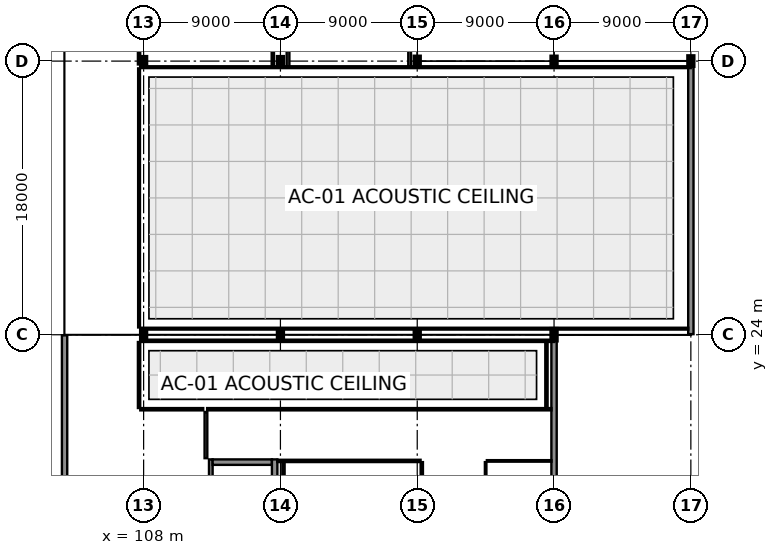
"""IFC4 building model, lengths in metres.
Left out: names, types, materials, properties, quantities, classifications, styles, units other than length and angle.
Written with IfcOpenShell. Run it as: python <this file> out.ifc"""

import sys

from ifc_helpers import new_model, si_unit, direction, frame, frame_2d, origin, origin_2d, place, context, subcontext, project, spatial, rectangle, i_section, extrude, element, fill, save


model = new_model("IFC4")
c1 = context("Model", 3, precision=1e-05, world=origin(), true_north=direction((0.0, 1.0)))
c2 = subcontext(c1, "Body", "Model", "MODEL_VIEW")
j1 = project(units=[si_unit("LENGTHUNIT", "METRE"), si_unit("PLANEANGLEUNIT", "RADIAN")], contexts=[c1])
p1 = place(None, origin())
s1 = spatial("IfcSite", under=j1, at=p1, CompositionType="ELEMENT")
p2 = place(p1, origin())
s2 = spatial("IfcBuilding", under=s1, at=p2, CompositionType="ELEMENT")
p3 = place(p2, origin())
s3 = spatial("IfcBuildingStorey", under=s2, at=p3, CompositionType="ELEMENT", Elevation=0.0)
p4 = place(p3, frame((108.0, 24.0, 0.0), z_axis=(0.0, 0.0, 1.0), x_axis=(1.0, 0.0, 0.0)))
e1 = element("IfcColumn", 1, at=p4, inside=s3, PredefinedType="COLUMN", context=c2, shape_type="SweptSolid", body=[
    extrude(i_section(OverallWidth=0.3, OverallDepth=0.65, WebThickness=0.016, FlangeThickness=0.031, at=origin_2d()), origin(), (0.0, 0.0, 1.0), 5.4),
])
p5 = place(p3, frame((108.0, 42.0, 0.0), z_axis=(0.0, 0.0, 1.0), x_axis=(1.0, 0.0, 0.0)))
e2 = element("IfcColumn", 2, at=p5, inside=s3, PredefinedType="COLUMN", context=c2, shape_type="SweptSolid", body=[
    extrude(i_section(OverallWidth=0.3, OverallDepth=0.5, WebThickness=0.014, FlangeThickness=0.028, at=origin_2d()), origin(), (0.0, 0.0, 1.0), 5.4),
])
p6 = place(p3, frame((117.0, 24.0, 0.0), z_axis=(0.0, 0.0, 1.0), x_axis=(1.0, 0.0, 0.0)))
e3 = element("IfcColumn", 3, at=p6, inside=s3, PredefinedType="COLUMN", context=c2, shape_type="SweptSolid", body=[
    extrude(i_section(OverallWidth=0.3, OverallDepth=0.65, WebThickness=0.016, FlangeThickness=0.031, at=origin_2d()), origin(), (0.0, 0.0, 1.0), 5.4),
])
p7 = place(p3, frame((117.0, 42.0, 0.0), z_axis=(0.0, 0.0, 1.0), x_axis=(0.0, 1.0, 0.0)))
e4 = element("IfcColumn", 4, at=p7, inside=s3, PredefinedType="COLUMN", context=c2, shape_type="SweptSolid", body=[
    extrude(i_section(OverallWidth=0.3, OverallDepth=0.5, WebThickness=0.014, FlangeThickness=0.028, at=origin_2d()), origin(), (0.0, 0.0, 1.0), 5.4),
])
p8 = place(p3, frame((126.0, 24.0, 0.0), z_axis=(0.0, 0.0, 1.0), x_axis=(1.0, 0.0, 0.0)))
e5 = element("IfcColumn", 5, at=p8, inside=s3, PredefinedType="COLUMN", context=c2, shape_type="SweptSolid", body=[
    extrude(i_section(OverallWidth=0.3, OverallDepth=0.65, WebThickness=0.016, FlangeThickness=0.031, at=origin_2d()), origin(), (0.0, 0.0, 1.0), 5.4),
])
p9 = place(p3, frame((126.0, 42.0, 0.0), z_axis=(0.0, 0.0, 1.0), x_axis=(1.0, 0.0, 0.0)))
e6 = element("IfcColumn", 6, at=p9, inside=s3, PredefinedType="COLUMN", context=c2, shape_type="SweptSolid", body=[
    extrude(i_section(OverallWidth=0.3, OverallDepth=0.55, WebThickness=0.015, FlangeThickness=0.029, at=origin_2d()), origin(), (0.0, 0.0, 1.0), 5.4),
])
p10 = place(p3, frame((135.0, 24.0, 0.0), z_axis=(0.0, 0.0, 1.0), x_axis=(1.0, 0.0, 0.0)))
e7 = element("IfcColumn", 7, at=p10, inside=s3, PredefinedType="COLUMN", context=c2, shape_type="SweptSolid", body=[
    extrude(i_section(OverallWidth=0.304, OverallDepth=0.716, WebThickness=0.021, FlangeThickness=0.04, at=origin_2d()), origin(), (0.0, 0.0, 1.0), 5.4),
])
p11 = place(p3, frame((135.0, 42.0, 0.0), z_axis=(0.0, 0.0, 1.0), x_axis=(1.0, 0.0, 0.0)))
e8 = element("IfcColumn", 8, at=p11, inside=s3, PredefinedType="COLUMN", context=c2, shape_type="SweptSolid", body=[
    extrude(i_section(OverallWidth=0.3, OverallDepth=0.55, WebThickness=0.015, FlangeThickness=0.029, at=origin_2d()), origin(), (0.0, 0.0, 1.0), 5.4),
])
p12 = place(p3, frame((144.0, 42.0, 0.0), z_axis=(0.0, 0.0, 1.0), x_axis=(1.0, 0.0, 0.0)))
e9 = element("IfcColumn", 9, at=p12, inside=s3, PredefinedType="COLUMN", context=c2, shape_type="SweptSolid", body=[
    extrude(i_section(OverallWidth=0.3, OverallDepth=0.6, WebThickness=0.015, FlangeThickness=0.03, at=origin_2d()), origin(), (0.0, 0.0, 1.0), 5.4),
])
p13 = place(p3, frame((144.0, 24.04, 0.0), z_axis=(0.0, 0.0, 1.0), x_axis=(0.0, 1.0, 0.0)))
e10 = element("IfcWall", 10, at=p13, inside=s3, PredefinedType="SOLIDWALL", context=c2, shape_type="SweptSolid", body=[
    extrude(rectangle(XDim=17.662, YDim=0.35, at=frame_2d((8.831, 0.0))), origin(), (0.0, 0.0, 1.0), 5.08),
])
p14 = place(p13, frame((7.86, 0.0, 0.0)))
e11 = element("IfcOpeningElement", 11, at=p14, cuts=e10, PredefinedType="OPENING", context=c2, shape_type="SweptSolid", body=[
    extrude(rectangle(XDim=2.2, YDim=2.7, at=frame_2d((1.1, 1.35))), frame((0.0, 0.19, 0.0), z_axis=(0.0, -1.0, 0.0), x_axis=(1.0, 0.0, 0.0)), (0.0, 0.0, 1.0), 0.38),
])
p15 = place(p3, frame((135.0, 12.356, 0.0), z_axis=(0.0, 0.0, 1.0), x_axis=(0.0, 1.0, 0.0)))
e12 = element("IfcWall", 12, at=p15, inside=s3, PredefinedType="SOLIDWALL", context=c2, shape_type="SweptSolid", body=[
    extrude(rectangle(XDim=11.288, YDim=0.35, at=frame_2d((5.644, 0.0))), origin(), (0.0, 0.0, 1.0), 4.525),
])
p16 = place(p15, frame((3.844, 0.0, 0.0)))
e13 = element("IfcOpeningElement", 13, at=p16, cuts=e12, PredefinedType="OPENING", context=c2, shape_type="SweptSolid", body=[
    extrude(rectangle(XDim=2.4, YDim=2.8, at=frame_2d((1.2, 1.4))), frame((0.0, 0.19, 0.0), z_axis=(0.0, -1.0, 0.0), x_axis=(1.0, 0.0, 0.0)), (0.0, 0.0, 1.0), 0.38),
])
p17 = place(p3, frame((102.8, 23.96, 0.0), z_axis=(0.0, 0.0, 1.0), x_axis=(0.0, -1.0, 0.0)))
e14 = element("IfcWall", 14, at=p17, inside=s3, PredefinedType="SOLIDWALL", context=c2, shape_type="SweptSolid", body=[
    extrude(rectangle(XDim=11.97, YDim=0.35, at=frame_2d((5.985, 0.0))), origin(), (0.0, 0.0, 1.0), 5.08),
])
p18 = place(p17, frame((5.2, 0.0, 0.85)))
e15 = element("IfcOpeningElement", 15, at=p18, cuts=e14, PredefinedType="OPENING", context=c2, shape_type="SweptSolid", body=[
    extrude(rectangle(XDim=2.2, YDim=1.4, at=frame_2d((1.1, 0.7))), frame((0.0, 0.19, 0.0), z_axis=(0.0, -1.0, 0.0), x_axis=(1.0, 0.0, 0.0)), (0.0, 0.0, 1.0), 0.38),
])
p19 = place(p3, frame((112.42, 13.04, 0.0), z_axis=(0.0, 0.0, 1.0), x_axis=(0.0, 1.0, 0.0)))
e16 = element("IfcWall", 16, at=p19, inside=s3, PredefinedType="SHEAR", context=c2, shape_type="SweptSolid", body=[
    extrude(rectangle(XDim=2.76, YDim=0.24, at=frame_2d((1.38, 0.0))), origin(), (0.0, 0.0, 1.0), 5.06),
])
p20 = place(p3, frame((112.54, 15.62, 0.0), z_axis=(0.0, 0.0, 1.0), x_axis=(1.0, 0.0, 0.0)))
e17 = element("IfcWall", 17, at=p20, inside=s3, PredefinedType="SHEAR", context=c2, shape_type="SweptSolid", body=[
    extrude(rectangle(XDim=3.9, YDim=0.36, at=frame_2d((1.95, 0.0))), origin(), (0.0, 0.0, 1.0), 5.06),
])
p21 = place(p20, frame((1.15, 0.0, 0.0)))
e18 = element("IfcOpeningElement", 18, at=p21, cuts=e17, PredefinedType="OPENING", context=c2, shape_type="SweptSolid", body=[
    extrude(rectangle(XDim=1.6, YDim=2.25, at=frame_2d((0.8, 1.125))), frame((0.0, 0.195, 0.0), z_axis=(0.0, -1.0, 0.0), x_axis=(1.0, 0.0, 0.0)), (0.0, 0.0, 1.0), 0.39),
])
p22 = place(p3, frame((116.62, 6.76, 0.0), z_axis=(0.0, 0.0, 1.0), x_axis=(0.0, 1.0, 0.0)))
e19 = element("IfcWall", 19, at=p22, inside=s3, PredefinedType="SHEAR", context=c2, shape_type="SweptSolid", body=[
    extrude(rectangle(XDim=9.04, YDim=0.36, at=frame_2d((4.52, 0.0))), origin(), (0.0, 0.0, 1.0), 5.06),
])
p23 = place(p3, frame((112.1, 15.88, 0.0), z_axis=(0.0, 0.0, 1.0), x_axis=(0.0, 1.0, 0.0)))
e20 = element("IfcWall", 20, at=p23, inside=s3, PredefinedType="PARTITIONING", context=c2, shape_type="SweptSolid", body=[
    extrude(rectangle(XDim=3.04, YDim=0.18, at=frame_2d((1.52, 0.0))), origin(), (0.0, 0.0, 1.0), 5.04),
])
p24 = place(p23, frame((0.795, 0.0, 0.0)))
e21 = element("IfcOpeningElement", 21, at=p24, cuts=e20, PredefinedType="OPENING", context=c2, shape_type="SweptSolid", body=[
    extrude(rectangle(XDim=1.45, YDim=2.2, at=frame_2d((0.725, 1.1))), frame((0.0, 0.105, 0.0), z_axis=(0.0, -1.0, 0.0), x_axis=(1.0, 0.0, 0.0)), (0.0, 0.0, 1.0), 0.21),
])
p25 = place(p3, frame((143.83, 24.4, 0.0), z_axis=(0.0, 0.0, 1.0), x_axis=(-1.0, 0.0, 0.0)))
e22 = element("IfcWall", 22, at=p25, inside=s3, PredefinedType="PARTITIONING", context=c2, shape_type="SweptSolid", body=[
    extrude(rectangle(XDim=36.05, YDim=0.12, at=frame_2d((18.025, 0.0))), origin(), (0.0, 0.0, 1.0), 5.04),
])
p26 = place(p3, frame((107.7, 24.48, 0.0), z_axis=(0.0, 0.0, 1.0), x_axis=(0.0, 1.0, 0.0)))
e23 = element("IfcWall", 23, at=p26, inside=s3, PredefinedType="PARTITIONING", context=c2, shape_type="SweptSolid", body=[
    extrude(rectangle(XDim=17.04, YDim=0.12, at=frame_2d((8.52, 0.0))), origin(), (0.0, 0.0, 1.0), 5.04),
])
p27 = place(p26, frame((8.07, 0.0, 0.0)))
e24 = element("IfcOpeningElement", 24, at=p27, cuts=e23, PredefinedType="OPENING", context=c2, shape_type="SweptSolid", body=[
    extrude(rectangle(XDim=0.9, YDim=2.1, at=frame_2d((0.45, 1.05))), frame((0.0, 0.075, 0.0), z_axis=(0.0, -1.0, 0.0), x_axis=(1.0, 0.0, 0.0)), (0.0, 0.0, 1.0), 0.15),
])
p28 = place(p26, frame((14.09, 0.0, 1.05)))
e25 = element("IfcOpeningElement", 25, at=p28, cuts=e23, PredefinedType="OPENING", context=c2, shape_type="SweptSolid", body=[
    extrude(rectangle(XDim=2.1, YDim=1.2, at=frame_2d((1.05, 0.6))), frame((0.0, 0.075, 0.0), z_axis=(0.0, -1.0, 0.0), x_axis=(1.0, 0.0, 0.0)), (0.0, 0.0, 1.0), 0.15),
])
p29 = place(p3, frame((107.78, 41.6, 0.0), z_axis=(0.0, 0.0, 1.0), x_axis=(1.0, 0.0, 0.0)))
e26 = element("IfcWall", 26, at=p29, inside=s3, PredefinedType="PARTITIONING", context=c2, shape_type="SweptSolid", body=[
    extrude(rectangle(XDim=36.212, YDim=0.12, at=frame_2d((18.106, 0.0))), origin(), (0.0, 0.0, 1.0), 5.04),
])
p30 = place(p3, frame((116.5, 50.82, 0.0), z_axis=(0.0, 0.0, 1.0), x_axis=(0.0, -1.0, 0.0)))
e27 = element("IfcWall", 27, at=p30, inside=s3, PredefinedType="PARTITIONING", context=c2, shape_type="SweptSolid", body=[
    extrude(rectangle(XDim=9.165, YDim=0.15, at=frame_2d((4.583, 0.0))), origin(), (0.0, 0.0, 1.0), 5.04),
])
p31 = place(p3, frame((107.7, 41.78, 0.0), z_axis=(0.0, 0.0, 1.0), x_axis=(0.0, 1.0, 0.0)))
e28 = element("IfcWall", 28, at=p31, inside=s3, PredefinedType="PARTITIONING", context=c2, shape_type="SweptSolid", body=[
    extrude(rectangle(XDim=9.04, YDim=0.15, at=frame_2d((4.52, 0.0))), origin(), (0.0, 0.0, 1.0), 5.04),
])
p32 = place(p31, frame((3.995, 0.0, 0.0)))
e29 = element("IfcOpeningElement", 29, at=p32, cuts=e28, PredefinedType="OPENING", context=c2, shape_type="SweptSolid", body=[
    extrude(rectangle(XDim=1.05, YDim=2.25, at=frame_2d((0.525, 1.125))), frame((0.0, 0.09, 0.0), z_axis=(0.0, -1.0, 0.0), x_axis=(1.0, 0.0, 0.0)), (0.0, 0.0, 1.0), 0.18),
])
p33 = place(p31, frame((6.39, 0.0, 1.05)))
e30 = element("IfcOpeningElement", 30, at=p33, cuts=e28, PredefinedType="OPENING", context=c2, shape_type="SweptSolid", body=[
    extrude(rectangle(XDim=1.8, YDim=1.1, at=frame_2d((0.9, 0.55))), frame((0.0, 0.09, 0.0), z_axis=(0.0, -1.0, 0.0), x_axis=(1.0, 0.0, 0.0)), (0.0, 0.0, 1.0), 0.18),
])
for number, where, z_axis, x_axis in (
    (31, (117.5, 41.655, 0.0), (0.0, 0.0, 1.0), (0.0, 1.0, 0.0)),
    (32, (125.5, 50.82, 0.0), (0.0, 0.0, 1.0), (0.0, -1.0, 0.0)),
):
    element("IfcWall", number, at=place(p3, frame(where, z_axis=z_axis, x_axis=x_axis)), inside=s3, PredefinedType="PARTITIONING", context=c2, shape_type="SweptSolid", body=[
        extrude(rectangle(XDim=9.165, YDim=0.18, at=frame_2d((4.583, 0.0))), origin(), (0.0, 0.0, 1.0), 5.04),
    ])
p34 = place(p3, frame((111.92, 19.1, 0.0), z_axis=(0.0, 0.0, 1.0), x_axis=(-1.0, 0.0, 0.0)))
e33 = element("IfcWall", 33, at=p34, inside=s3, PredefinedType="PARTITIONING", context=c2, shape_type="SweptSolid", body=[
    extrude(rectangle(XDim=4.14, YDim=0.15, at=frame_2d((2.07, 0.0))), origin(), (0.0, 0.0, 1.0), 5.04),
])
p35 = place(p3, frame((107.7, 19.18, 0.0), z_axis=(0.0, 0.0, 1.0), x_axis=(0.0, 1.0, 0.0)))
e34 = element("IfcWall", 34, at=p35, inside=s3, PredefinedType="PARTITIONING", context=c2, shape_type="SweptSolid", body=[
    extrude(rectangle(XDim=4.34, YDim=0.15, at=frame_2d((2.17, 0.0))), origin(), (0.0, 0.0, 1.0), 5.04),
])
p36 = place(p35, frame((1.645, 0.0, 0.0)))
e35 = element("IfcOpeningElement", 35, at=p36, cuts=e34, PredefinedType="OPENING", context=c2, shape_type="SweptSolid", body=[
    extrude(rectangle(XDim=1.05, YDim=2.25, at=frame_2d((0.525, 1.125))), frame((0.0, 0.09, 0.0), z_axis=(0.0, -1.0, 0.0), x_axis=(1.0, 0.0, 0.0)), (0.0, 0.0, 1.0), 0.18),
])
p37 = place(p3, frame((107.78, 23.6, 0.0), z_axis=(0.0, 0.0, 1.0), x_axis=(1.0, 0.0, 0.0)))
e36 = element("IfcWall", 36, at=p37, inside=s3, PredefinedType="PARTITIONING", context=c2, shape_type="SweptSolid", body=[
    extrude(rectangle(XDim=27.212, YDim=0.15, at=frame_2d((13.606, 0.0))), origin(), (0.0, 0.0, 1.0), 5.04),
])
p38 = place(p3, frame((134.5, 23.53, 0.0), z_axis=(0.0, 0.0, 1.0), x_axis=(0.0, -1.0, 0.0)))
e37 = element("IfcWall", 37, at=p38, inside=s3, PredefinedType="PARTITIONING", context=c2, shape_type="SweptSolid", body=[
    extrude(rectangle(XDim=4.35, YDim=0.15, at=frame_2d((2.175, 0.0))), origin(), (0.0, 0.0, 1.0), 5.04),
])
p39 = place(p3, frame((134.83, 19.1, 0.0), z_axis=(0.0, 0.0, 1.0), x_axis=(-1.0, 0.0, 0.0)))
e38 = element("IfcWall", 38, at=p39, inside=s3, PredefinedType="PARTITIONING", context=c2, shape_type="SweptSolid", body=[
    extrude(rectangle(XDim=22.65, YDim=0.15, at=frame_2d((11.325, 0.0))), origin(), (0.0, 0.0, 1.0), 5.04),
])
p40 = place(p3, frame((126.3, 15.62, 0.0), z_axis=(0.0, 0.0, 1.0), x_axis=(0.0, -1.0, 0.0)))
e39 = element("IfcWall", 39, at=p40, inside=s3, PredefinedType="PARTITIONING", context=c2, shape_type="SweptSolid", body=[
    extrude(rectangle(XDim=3.04, YDim=0.15, at=frame_2d((1.52, 0.0))), origin(), (0.0, 0.0, 1.0), 5.04),
])
p41 = place(p40, frame((0.995, 0.0, 0.0)))
e40 = element("IfcOpeningElement", 40, at=p41, cuts=e39, PredefinedType="OPENING", context=c2, shape_type="SweptSolid", body=[
    extrude(rectangle(XDim=1.05, YDim=2.25, at=frame_2d((0.525, 1.125))), frame((0.0, 0.09, 0.0), z_axis=(0.0, -1.0, 0.0), x_axis=(1.0, 0.0, 0.0)), (0.0, 0.0, 1.0), 0.18),
])
p42 = place(p3, frame((117.2, 12.57, 0.0), z_axis=(0.0, 0.0, 1.0), x_axis=(0.0, 1.0, 0.0)))
e41 = element("IfcWall", 41, at=p42, inside=s3, PredefinedType="PARTITIONING", context=c2, shape_type="SweptSolid", body=[
    extrude(rectangle(XDim=3.05, YDim=0.15, at=frame_2d((1.525, 0.0))), origin(), (0.0, 0.0, 1.0), 4.635),
])
p43 = place(p3, frame((116.795, 15.7, 0.0), z_axis=(0.0, 0.0, 1.0), x_axis=(1.0, 0.0, 0.0)))
e42 = element("IfcWall", 42, at=p43, inside=s3, PredefinedType="PARTITIONING", context=c2, shape_type="SweptSolid", body=[
    extrude(rectangle(XDim=9.425, YDim=0.15, at=frame_2d((4.712, 0.0))), origin(), (0.0, 0.0, 1.0), 5.04),
])
p44 = place(p3, frame((130.58, 15.7, 0.0), z_axis=(0.0, 0.0, 1.0), x_axis=(1.0, 0.0, 0.0)))
e43 = element("IfcWall", 43, at=p44, inside=s3, PredefinedType="PARTITIONING", context=c2, shape_type="SweptSolid", body=[
    extrude(rectangle(XDim=4.25, YDim=0.1, at=frame_2d((2.125, 0.0))), origin(), (0.0, 0.0, 1.0), 5.04),
])
p45 = place(p3, frame((130.5, 13.08, 0.0), z_axis=(0.0, 0.0, 1.0), x_axis=(0.0, 1.0, 0.0)))
e44 = element("IfcWall", 44, at=p45, inside=s3, PredefinedType="PARTITIONING", context=c2, shape_type="SweptSolid", body=[
    extrude(rectangle(XDim=2.54, YDim=0.1, at=frame_2d((1.27, 0.0))), origin(), (0.0, 0.0, 1.0), 5.04),
])
p46 = place(p45, frame((0.82, 0.0, 0.0)))
e45 = element("IfcOpeningElement", 45, at=p46, cuts=e44, PredefinedType="OPENING", context=c2, shape_type="SweptSolid", body=[
    extrude(rectangle(XDim=0.9, YDim=2.05, at=frame_2d((0.45, 1.025))), frame((0.0, 0.065, 0.0), z_axis=(0.0, -1.0, 0.0), x_axis=(1.0, 0.0, 0.0)), (0.0, 0.0, 1.0), 0.13),
])
p47 = place(p16, frame((2.4, 0.0, 0.0), z_axis=(0.0, 0.0, 1.0), x_axis=(-1.0, 0.0, 0.0)))
e46 = element("IfcDoor", 46, at=p47, inside=s3, OperationType="DOUBLE_DOOR_SINGLE_SWING", PredefinedType="DOOR", context=c2, shape_type="SweptSolid", body=[
    extrude(rectangle(XDim=2.4, YDim=2.8, at=frame_2d((1.2, 1.4))), frame((0.0, 0.025, 0.0), z_axis=(0.0, -1.0, 0.0), x_axis=(1.0, 0.0, 0.0)), (0.0, 0.0, 1.0), 0.05),
])
fill(e13, e46)
p48 = place(p14, frame((2.2, 0.0, 0.0), z_axis=(0.0, 0.0, 1.0), x_axis=(-1.0, 0.0, 0.0)))
e47 = element("IfcDoor", 47, at=p48, inside=s3, OperationType="DOUBLE_DOOR_SINGLE_SWING", PredefinedType="DOOR", context=c2, shape_type="SweptSolid", body=[
    extrude(rectangle(XDim=2.2, YDim=2.7, at=frame_2d((1.1, 1.35))), frame((0.0, 0.025, 0.0), z_axis=(0.0, -1.0, 0.0), x_axis=(1.0, 0.0, 0.0)), (0.0, 0.0, 1.0), 0.05),
])
fill(e11, e47)
p49 = place(p18, origin())
e48 = element("IfcWindow", 48, at=p49, inside=s3, PartitioningType="SINGLE_PANEL", PredefinedType="WINDOW", context=c2, shape_type="SweptSolid", body=[
    extrude(rectangle(XDim=2.2, YDim=1.4, at=frame_2d((1.1, 0.7))), frame((0.0, 0.03, 0.0), z_axis=(0.0, -1.0, 0.0), x_axis=(1.0, 0.0, 0.0)), (0.0, 0.0, 1.0), 0.06),
])
fill(e15, e48)
p50 = place(p21, origin())
e49 = element("IfcDoor", 49, at=p50, inside=s3, OperationType="DOUBLE_DOOR_SINGLE_SWING", PredefinedType="DOOR", context=c2, shape_type="SweptSolid", body=[
    extrude(rectangle(XDim=1.6, YDim=2.25, at=frame_2d((0.8, 1.125))), frame((0.0, 0.025, 0.0), z_axis=(0.0, -1.0, 0.0), x_axis=(1.0, 0.0, 0.0)), (0.0, 0.0, 1.0), 0.05),
])
fill(e18, e49)
p51 = place(p24, origin())
e50 = element("IfcDoor", 50, at=p51, inside=s3, OperationType="DOUBLE_DOOR_SINGLE_SWING", PredefinedType="DOOR", context=c2, shape_type="SweptSolid", body=[
    extrude(rectangle(XDim=1.45, YDim=2.2, at=frame_2d((0.725, 1.1))), frame((0.0, 0.025, 0.0), z_axis=(0.0, -1.0, 0.0), x_axis=(1.0, 0.0, 0.0)), (0.0, 0.0, 1.0), 0.05),
])
fill(e21, e50)
p52 = place(p27, origin())
e51 = element("IfcDoor", 51, at=p52, inside=s3, OperationType="SINGLE_SWING_LEFT", PredefinedType="DOOR", context=c2, shape_type="SweptSolid", body=[
    extrude(rectangle(XDim=0.9, YDim=2.1, at=frame_2d((0.45, 1.05))), frame((0.0, 0.025, 0.0), z_axis=(0.0, -1.0, 0.0), x_axis=(1.0, 0.0, 0.0)), (0.0, 0.0, 1.0), 0.05),
])
fill(e24, e51)
p53 = place(p28, origin())
e52 = element("IfcWindow", 52, at=p53, inside=s3, PartitioningType="SINGLE_PANEL", PredefinedType="WINDOW", context=c2, shape_type="SweptSolid", body=[
    extrude(rectangle(XDim=2.1, YDim=1.2, at=frame_2d((1.05, 0.6))), frame((0.0, 0.03, 0.0), z_axis=(0.0, -1.0, 0.0), x_axis=(1.0, 0.0, 0.0)), (0.0, 0.0, 1.0), 0.06),
])
fill(e25, e52)
p54 = place(p36, origin())
e53 = element("IfcDoor", 53, at=p54, inside=s3, OperationType="SINGLE_SWING_RIGHT", PredefinedType="DOOR", context=c2, shape_type="SweptSolid", body=[
    extrude(rectangle(XDim=1.05, YDim=2.25, at=frame_2d((0.525, 1.125))), frame((0.0, 0.025, 0.0), z_axis=(0.0, -1.0, 0.0), x_axis=(1.0, 0.0, 0.0)), (0.0, 0.0, 1.0), 0.05),
])
fill(e35, e53)
save(model, sys.argv[1])
